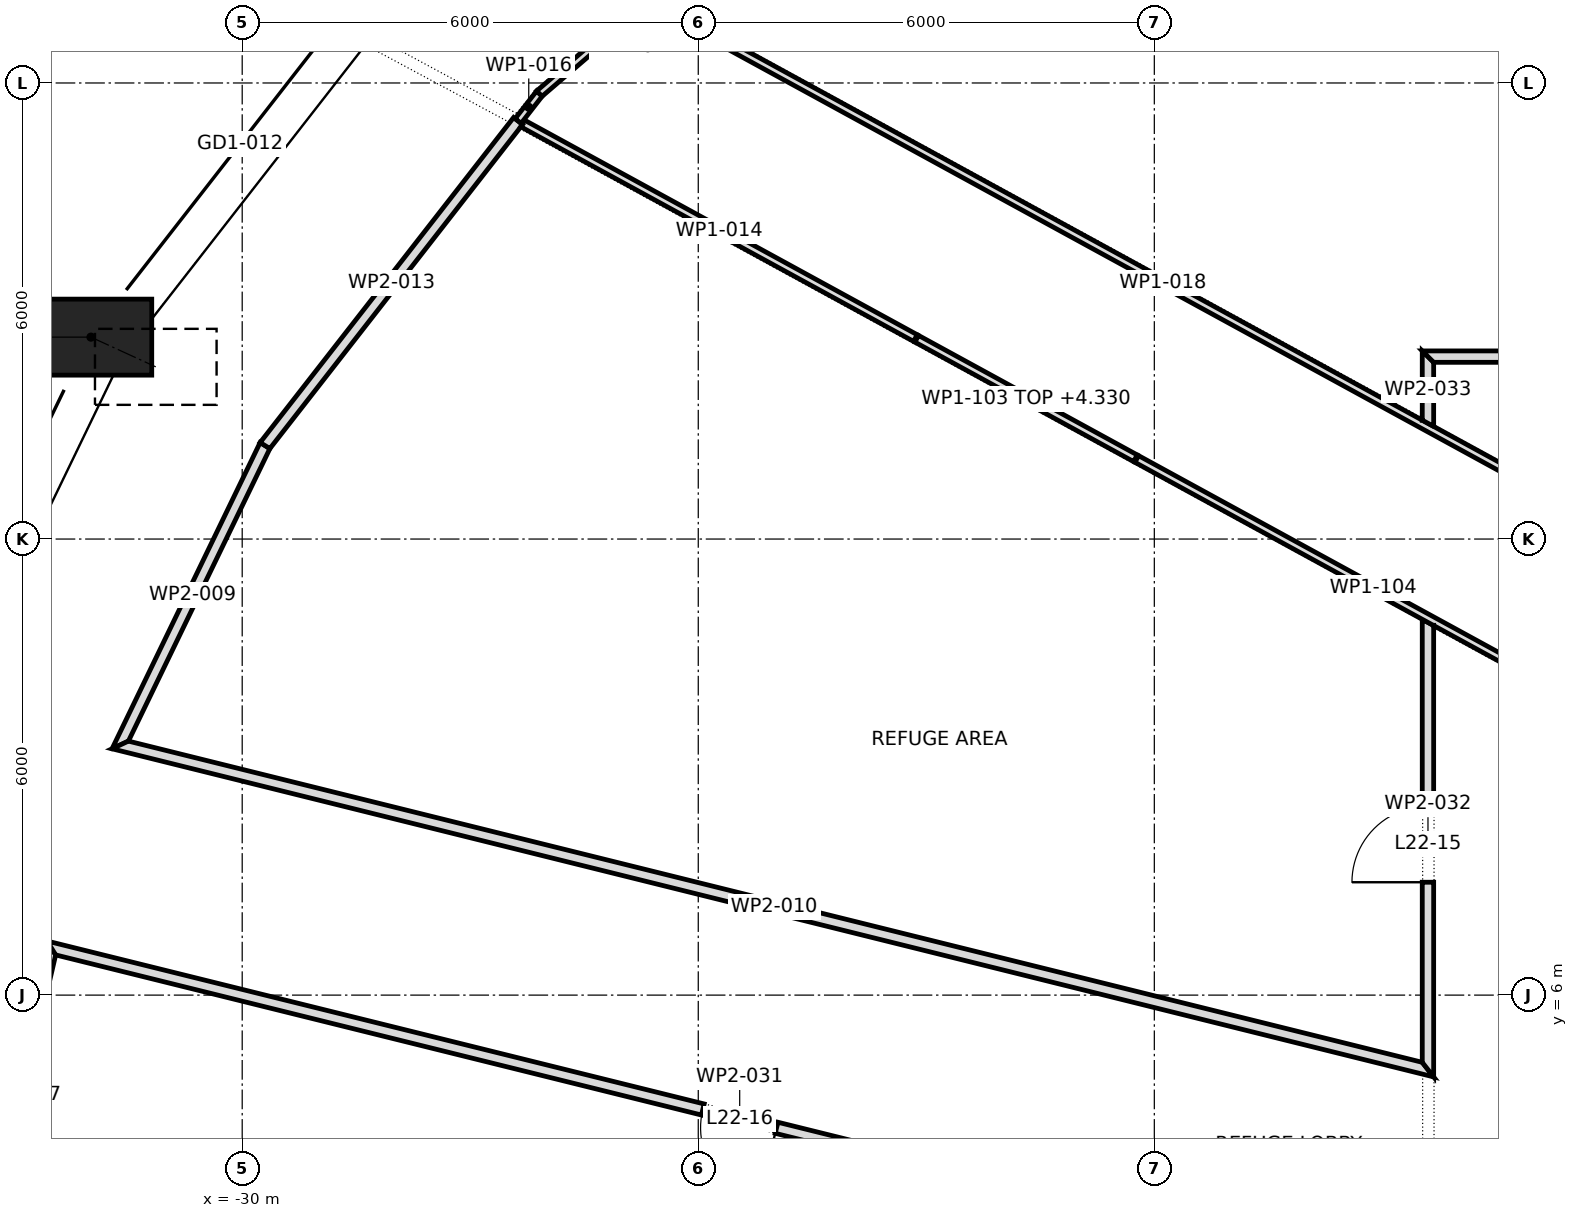
"""IFC4 building model, lengths in metres.
Left out: names, types, materials, properties, quantities, classifications, styles, units other than length and angle.
Written with IfcOpenShell. Run it as: python <this file> out.ifc"""

import sys

from ifc_helpers import new_model, si_unit, direction, frame, frame_2d, origin, origin_2d, place, context, subcontext, project, spatial, polyline, rectangle, outline, extrude, element, fill, save


model = new_model("IFC4")
c1 = context("Model", 3, precision=1e-05, world=origin(), true_north=direction((0.0, 1.0)))
c2 = subcontext(c1, "Body", "Model", "MODEL_VIEW")
j1 = project(units=[si_unit("LENGTHUNIT", "METRE"), si_unit("PLANEANGLEUNIT", "RADIAN")], contexts=[c1])
p1 = place(None, origin())
s1 = spatial("IfcSite", under=j1, at=p1, CompositionType="ELEMENT")
p2 = place(p1, origin())
s2 = spatial("IfcBuilding", under=s1, at=p2, CompositionType="ELEMENT")
p3 = place(p2, frame((0.0, 0.0, 99.1)))
s3 = spatial("IfcBuildingStorey", under=s2, at=p3, CompositionType="ELEMENT", Elevation=99.1)
p4 = place(p3, frame((-28.04, 19.724, 0.086), z_axis=(0.140981797412, -0.099170230088, 0.985032688931), x_axis=(0.575341361803, 0.817913392358, 0.0)))
e1 = element("IfcColumn", 1, at=p4, inside=s3, PredefinedType="COLUMN", context=c2, shape_type="SweptSolid", body=[
    extrude(rectangle(XDim=1.6, YDim=1.0, at=origin_2d()), origin(), (0.0, 0.0, 1.0), 5.308),
])
p5 = place(p3, frame((-31.99, 14.656, 0.088), z_axis=(0.160721780276, -0.073644982891, 0.984248406572), x_axis=(0.416565116305, 0.909105881555, 0.0)))
e2 = element("IfcColumn", 2, at=p5, inside=s3, PredefinedType="COLUMN", context=c2, shape_type="SweptSolid", body=[
    extrude(rectangle(XDim=1.6, YDim=1.0, at=origin_2d()), origin(), (0.0, 0.0, 1.0), 5.307),
])
p6 = place(p3, frame((-32.493, 6.694, 0.0), z_axis=(0.0, 0.0, 1.0), x_axis=(-0.225920199459, -0.974145812226, 0.0)))
e3 = element("IfcWall", 3, at=p6, inside=s3, PredefinedType="PARTITIONING", context=c2, shape_type="SweptSolid", body=[
    extrude(outline(polyline([(0.0, -0.075), (1.356, -0.075), (2.712, -0.075), (4.068, -0.075), (4.051, 0.075), (2.101, 0.075), (0.152, 0.075), (0.0, -0.075), (0.0, -0.075)])), origin(), (0.0, 0.0, 1.0), 5.1),
])
p7 = place(p3, frame((-31.645, 9.208, 0.0), z_axis=(0.0, 0.0, 1.0), x_axis=(0.435304261424, 0.900283399817, 0.0)))
e4 = element("IfcWall", 4, at=p7, inside=s3, PredefinedType="PARTITIONING", context=c2, shape_type="SweptSolid", body=[
    extrude(outline(polyline([(0.185, -0.075), (1.61, -0.075), (3.035, -0.075), (4.459, -0.075), (4.476, 0.075), (2.984, 0.075), (1.492, 0.075), (0.0, 0.075), (0.185, -0.075)])), origin(), (0.0, 0.0, 1.0), 5.1),
])
p8 = place(p3, frame((-31.694, 9.313, 0.0), z_axis=(0.0, 0.0, 1.0), x_axis=(0.970538002946, -0.240948095734, 0.0)))
e5 = element("IfcWall", 5, at=p8, inside=s3, PredefinedType="PARTITIONING", context=c2, shape_type="SweptSolid", body=[
    extrude(outline(polyline([(0.0, -0.075), (1.991, -0.075), (3.981, -0.075), (5.972, -0.075), (7.962, -0.075), (9.953, -0.075), (11.944, -0.075), (13.934, -0.075), (15.925, -0.075), (17.915, -0.075), (17.724, 0.075), (15.775, 0.075), (13.826, 0.075), (11.877, 0.075), (9.928, 0.075), (7.98, 0.075), (6.031, 0.075), (4.082, 0.075), (2.134, 0.075), (0.185, 0.075), (0.0, -0.075)])), origin(), (0.0, 0.0, 1.0), 5.1),
])
p9 = place(p3, frame((-26.37, 17.5, 0.0), z_axis=(0.0, 0.0, 1.0), x_axis=(-0.614934385905, -0.788578278316, 0.0)))
e6 = element("IfcWall", 6, at=p9, inside=s3, PredefinedType="PARTITIONING", context=c2, shape_type="SweptSolid", body=[
    extrude(outline(polyline([(0.0, -0.075), (1.808, -0.075), (3.615, -0.075), (5.423, -0.075), (5.407, 0.075), (3.604, 0.075), (1.802, 0.075), (0.0, 0.075), (0.0, -0.075)])), origin(), (0.0, 0.0, 1.0), 5.1),
])
p10 = place(p3, frame((-26.318, 17.472, 0.0), z_axis=(0.0, 0.0, 1.0), x_axis=(0.877549423274, -0.479486193453, 0.0)))
e7 = element("IfcWall", 7, at=p10, inside=s3, PredefinedType="PARTITIONING", context=c2, shape_type="SweptSolid", body=[
    extrude(outline(polyline([(0.0, 0.05), (0.0, -0.01), (0.015, -0.012), (0.009, -0.05), (1.975, -0.05), (3.941, -0.05), (5.907, -0.05), (5.907, 0.05), (3.938, 0.05), (1.969, 0.05), (0.0, 0.05)])), origin(), (0.0, 0.0, 1.0), 5.1),
])
p11 = place(p3, frame((-26.087, 17.864, 0.0), z_axis=(0.0, 0.0, 1.0), x_axis=(-0.614050550298, -0.789266698702, 0.0)))
e8 = element("IfcWall", 8, at=p11, inside=s3, PredefinedType="PARTITIONING", context=c2, shape_type="SweptSolid", body=[
    extrude(outline(polyline([(0.461, 0.05), (0.01, 0.05), (0.0, -0.05), (0.461, -0.05), (0.461, 0.05)])), origin(), (0.0, 0.0, 1.0), 5.1),
])
p12 = place(p3, frame((-24.67, 19.08, 0.0), z_axis=(0.0, 0.0, 1.0), x_axis=(-0.758475731748, -0.6517012846, 0.0)))
e9 = element("IfcWall", 9, at=p12, inside=s3, PredefinedType="PARTITIONING", context=c2, shape_type="SweptSolid", body=[
    extrude(outline(polyline([(1.877, -0.05), (1.877, -0.05), (1.867, 0.05), (0.0, 0.05), (0.0, -0.05), (1.877, -0.05)])), origin(), (0.0, 0.0, 1.0), 5.1),
])
p13 = place(p3, frame((-24.639, 19.063, 0.0), z_axis=(0.0, 0.0, 1.0), x_axis=(0.877449064697, -0.479669822756, 0.0)))
e10 = element("IfcWall", 10, at=p13, inside=s3, PredefinedType="PARTITIONING", context=c2, shape_type="SweptSolid", body=[
    extrude(outline(polyline([(15.351, 0.05), (13.455, 0.05), (11.559, 0.05), (11.557, 0.049), (11.557, 0.05), (9.641, 0.05), (7.726, 0.05), (5.811, 0.05), (3.895, 0.05), (1.98, 0.05), (0.064, 0.05), (0.035, -0.027), (0.012, -0.018), (0.0, -0.049), (0.0, -0.05), (1.919, -0.05), (3.838, -0.05), (5.757, -0.05), (7.675, -0.05), (9.594, -0.05), (11.513, -0.05), (13.432, -0.05), (15.351, -0.05), (15.351, 0.05)])), origin(), (0.0, 0.0, 1.0), 5.1),
])
p14 = place(p3, frame((-16.928, 24.511, 0.0), z_axis=(0.0, 0.0, 1.0), x_axis=(0.528705028345, -0.848805627339, 0.0)))
e11 = element("IfcWall", 11, at=p14, inside=s3, PredefinedType="PARTITIONING", context=c2, shape_type="SweptSolid", body=[
    extrude(outline(polyline([(0.145, -0.075), (2.083, -0.075), (4.022, -0.075), (5.961, -0.075), (7.9, -0.075), (9.839, -0.075), (11.778, -0.075), (12.048, 0.075), (10.326, 0.075), (8.605, 0.075), (6.884, 0.075), (5.163, 0.075), (3.442, 0.075), (1.721, 0.075), (0.0, 0.075), (0.145, -0.075)])), origin(), (0.0, 0.0, 1.0), 5.1),
])
p15 = place(p3, frame((-14.343, 2.116, 0.0), z_axis=(0.0, 0.0, 1.0), x_axis=(-0.970616710199, 0.240630841505, 0.0)))
e12 = element("IfcWall", 12, at=p15, inside=s3, PredefinedType="PARTITIONING", context=c2, shape_type="SweptSolid", body=[
    extrude(outline(polyline([(0.0, -0.075), (1.879, -0.075), (3.759, -0.075), (5.638, -0.075), (7.517, -0.075), (9.396, -0.075), (11.276, -0.075), (13.155, -0.075), (15.034, -0.075), (16.914, -0.075), (18.793, -0.075), (18.641, 0.075), (16.788, 0.075), (14.936, 0.075), (13.084, 0.075), (11.231, 0.075), (9.379, 0.075), (7.527, 0.075), (5.674, 0.075), (3.822, 0.075), (1.969, 0.075), (0.117, 0.075), (0.0, -0.075), (0.0, -0.075)])), origin(), (0.0, 0.0, 1.0), 5.1),
])
p16 = place(p15, frame((8.888, 0.0, 0.0)))
e13 = element("IfcOpeningElement", 13, at=p16, cuts=e12, PredefinedType="OPENING", context=c2, shape_type="SweptSolid", body=[
    extrude(rectangle(XDim=1.0, YDim=2.1, at=frame_2d((0.5, 1.05))), frame((0.0, 0.087, 0.0), z_axis=(0.0, -1.0, 0.0), x_axis=(1.0, 0.0, 0.0)), (0.0, 0.0, 1.0), 0.174),
])
p17 = place(p3, frame((-14.4, 4.924, 0.0), z_axis=(0.0, 0.0, 1.0), x_axis=(0.0, 1.0, 0.0)))
e14 = element("IfcWall", 14, at=p17, inside=s3, PredefinedType="PARTITIONING", context=c2, shape_type="SweptSolid", body=[
    extrude(outline(polyline([(0.0, -0.075), (1.979, -0.075), (3.958, -0.075), (5.938, -0.075), (6.02, 0.074), (6.02, 0.075), (4.077, 0.075), (2.134, 0.075), (0.192, 0.075), (0.096, 0.0), (0.0, -0.075), (0.0, -0.075)])), origin(), (0.0, 0.0, 1.0), 5.1),
])
p18 = place(p17, frame((2.561, 0.0, 0.0)))
e15 = element("IfcOpeningElement", 15, at=p18, cuts=e14, PredefinedType="OPENING", context=c2, shape_type="SweptSolid", body=[
    extrude(rectangle(XDim=1.0, YDim=2.1, at=frame_2d((0.5, 1.05))), frame((0.0, 0.087, 0.0), z_axis=(0.0, -1.0, 0.0), x_axis=(1.0, 0.0, 0.0)), (0.0, 0.0, 1.0), 0.174),
])
p19 = place(p3, frame((-14.4, 13.482, 0.0), z_axis=(0.0, 0.0, 1.0), x_axis=(0.0, 1.0, 0.0)))
e16 = element("IfcWall", 16, at=p19, inside=s3, PredefinedType="PARTITIONING", context=c2, shape_type="SweptSolid", body=[
    extrude(outline(polyline([(0.0, -0.075), (0.843, -0.075), (0.843, -0.075), (0.993, 0.075), (0.082, 0.075), (0.0, -0.074), (0.0, -0.075)])), origin(), (0.0, 0.0, 1.0), 5.1),
])
p20 = place(p3, frame((-14.475, 14.4, 0.0), z_axis=(0.0, 0.0, 1.0), x_axis=(1.0, 0.0, 0.0)))
e17 = element("IfcWall", 17, at=p20, inside=s3, PredefinedType="PARTITIONING", context=c2, shape_type="SweptSolid", body=[
    extrude(outline(polyline([(3.98, -0.075), (3.98, -0.075), (3.71, 0.075), (1.855, 0.075), (0.0, 0.075), (0.15, -0.075), (2.065, -0.075), (3.98, -0.075)])), origin(), (0.0, 0.0, 1.0), 5.1),
])
p21 = place(p3, frame((-14.339, 25.649, 0.0), z_axis=(0.0, 0.0, 1.0), x_axis=(0.528834806377, -0.848724777277, 0.0)))
e18 = element("IfcWall", 18, at=p21, inside=s3, PredefinedType="PARTITIONING", context=c2, shape_type="SweptSolid", body=[
    extrude(outline(polyline([(13.296, -0.075), (13.296, -0.074), (13.213, 0.075), (11.352, 0.075), (9.491, 0.075), (7.63, 0.075), (5.769, 0.075), (3.908, 0.075), (2.047, 0.075), (0.187, 0.075), (0.0, -0.075), (0.0, -0.075), (1.899, -0.075), (3.799, -0.075), (5.698, -0.075), (7.597, -0.075), (9.497, -0.075), (11.396, -0.075), (13.296, -0.075)])), origin(), (0.0, 0.0, 1.0), 5.1),
])
p22 = place(p21, frame((6.174, 0.0, 0.0)))
e19 = element("IfcOpeningElement", 19, at=p22, cuts=e18, PredefinedType="OPENING", context=c2, shape_type="SweptSolid", body=[
    extrude(rectangle(XDim=1.0, YDim=2.1, at=frame_2d((0.5, 1.05))), frame((0.0, 0.087, 0.0), z_axis=(0.0, -1.0, 0.0), x_axis=(1.0, 0.0, 0.0)), (0.0, 0.0, 1.0), 0.174),
])
p23 = place(p3, frame((-21.135, 14.639, 0.0), z_axis=(0.0, 0.0, 1.0), x_axis=(0.877581388412, -0.479427686635, 0.0)))
e20 = element("IfcWall", 20, at=p23, inside=s3, PredefinedType="PARTITIONING", context=c2, shape_type="SweptSolid", body=[
    extrude(outline(polyline([(0.0, 0.05), (0.0, -0.05), (1.649, -0.05), (3.298, -0.05), (3.298, 0.05), (1.649, 0.05), (0.0, 0.05)])), origin(), (0.0, 0.0, 1.0), 4.33),
])
p24 = place(p3, frame((-18.24, 13.058, 0.0), z_axis=(0.0, 0.0, 1.0), x_axis=(0.877551538898, -0.479482321445, 0.0)))
e21 = element("IfcWall", 21, at=p24, inside=s3, PredefinedType="PARTITIONING", context=c2, shape_type="SweptSolid", body=[
    extrude(outline(polyline([(0.0, -0.05), (1.494, -0.05), (2.988, -0.05), (4.482, -0.05), (4.487, -0.047), (4.489, -0.05), (5.799, -0.05), (7.11, -0.05), (7.11, 0.05), (5.333, 0.05), (3.555, 0.05), (1.778, 0.05), (0.0, 0.05), (0.0, -0.05)])), origin(), (0.0, 0.0, 1.0), 5.1),
])
p25 = place(p18, origin())
e22 = element("IfcDoor", 22, at=p25, inside=s3, OperationType="SINGLE_SWING_RIGHT", PredefinedType="DOOR", context=c2, shape_type="SweptSolid", body=[
    extrude(rectangle(XDim=1.0, YDim=2.1, at=frame_2d((0.5, 1.05))), frame((0.0, 0.025, 0.0), z_axis=(0.0, -1.0, 0.0), x_axis=(1.0, 0.0, 0.0)), (0.0, 0.0, 1.0), 0.05),
])
fill(e15, e22)
p26 = place(p16, origin())
e23 = element("IfcDoor", 23, at=p26, inside=s3, OperationType="SINGLE_SWING_RIGHT", PredefinedType="DOOR", context=c2, shape_type="SweptSolid", body=[
    extrude(rectangle(XDim=1.0, YDim=2.1, at=frame_2d((0.5, 1.05))), frame((0.0, 0.025, 0.0), z_axis=(0.0, -1.0, 0.0), x_axis=(1.0, 0.0, 0.0)), (0.0, 0.0, 1.0), 0.05),
])
fill(e13, e23)
save(model, sys.argv[1])
